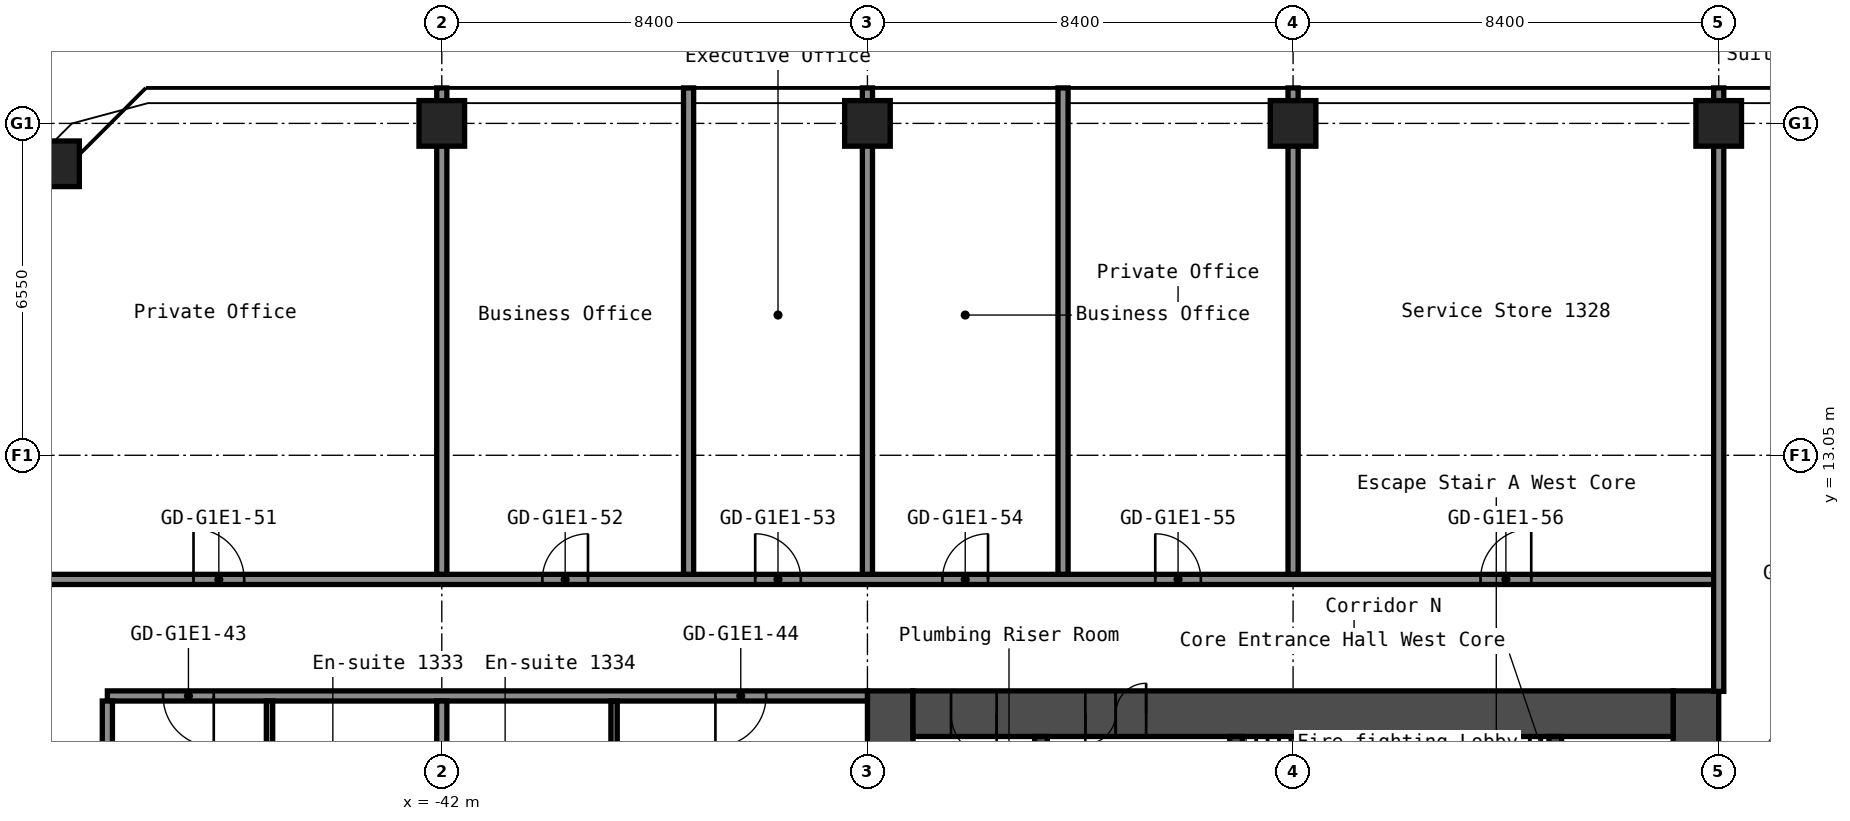
"""IFC4 building model, lengths in metres.
Left out: names, types, materials, properties, quantities, classifications, styles, units other than length and angle.
Written with IfcOpenShell. Run it as: python <this file> out.ifc"""

import sys

from ifc_helpers import new_model, si_unit, direction, frame, frame_2d, origin, origin_2d, place, context, subcontext, project, spatial, rectangle, hollow_rectangle, extrude, element, fill, save


model = new_model("IFC4")
c1 = context("Model", 3, precision=1e-05, world=origin(), true_north=direction((0.0, 1.0)))
c2 = subcontext(c1, "Body", "Model", "MODEL_VIEW")
j1 = project(units=[si_unit("LENGTHUNIT", "METRE"), si_unit("PLANEANGLEUNIT", "RADIAN")], contexts=[c1])
p1 = place(None, origin())
s1 = spatial("IfcSite", under=j1, at=p1, CompositionType="ELEMENT")
p2 = place(p1, origin())
s2 = spatial("IfcBuilding", under=s1, at=p2, CompositionType="ELEMENT")
p3 = place(p2, frame((0.0, 0.0, 48.6)))
s3 = spatial("IfcBuildingStorey", under=s2, at=p3, CompositionType="ELEMENT", Elevation=48.6)
for number, where, z_axis, x_axis in (
    (1, (-49.603, 18.803, 0.0), (0.0, 0.0, 1.0), (1.0, 0.0, 0.0)),
    (2, (-42.0, 19.6, 0.0), (0.0, 0.0, 1.0), (1.0, 0.0, 0.0)),
    (3, (-33.6, 19.6, 0.0), (0.0, 0.0, 1.0), (1.0, 0.0, 0.0)),
    (4, (-25.2, 19.6, 0.0), (0.0, 0.0, 1.0), (1.0, 0.0, 0.0)),
    (5, (-16.8, 19.6, 0.0), (0.0, 0.0, 1.0), (1.0, 0.0, 0.0)),
):
    element("IfcColumn", number, at=place(p3, frame(where, z_axis=z_axis, x_axis=x_axis)), inside=s3, PredefinedType="COLUMN", context=c2, shape_type="SweptSolid", body=[
        extrude(hollow_rectangle(XDim=0.9, YDim=0.9, WallThickness=0.036, at=origin_2d()), origin(), (0.0, 0.0, 1.0), 2.8),
    ])
p4 = place(p3, frame((-17.25, -8.4, 0.0), z_axis=(0.0, 0.0, 1.0), x_axis=(0.0, 1.0, 0.0)))
e6 = element("IfcWall", 6, at=p4, inside=s3, PredefinedType="SHEAR", context=c2, shape_type="SweptSolid", body=[
    extrude(rectangle(XDim=16.8, YDim=0.9, at=frame_2d((8.4, 0.0))), origin(), (0.0, 0.0, 1.0), 2.8),
])
p5 = place(p4, frame((12.75, 0.0, 0.0)))
e7 = element("IfcOpeningElement", 7, at=p5, cuts=e6, PredefinedType="OPENING", context=c2, shape_type="SweptSolid", body=[
    extrude(rectangle(XDim=1.2, YDim=2.1, at=frame_2d((0.6, 1.05))), frame((0.0, 0.46, 0.0), z_axis=(0.0, -1.0, 0.0), x_axis=(1.0, 0.0, 0.0)), (0.0, 0.0, 1.0), 0.92),
])
p6 = place(p4, frame((2.85, 0.0, 0.0)))
e8 = element("IfcOpeningElement", 8, at=p6, cuts=e6, PredefinedType="OPENING", context=c2, shape_type="SweptSolid", body=[
    extrude(rectangle(XDim=1.2, YDim=2.1, at=frame_2d((0.6, 1.05))), frame((0.0, 0.46, 0.0), z_axis=(0.0, -1.0, 0.0), x_axis=(1.0, 0.0, 0.0)), (0.0, 0.0, 1.0), 0.92),
])
p7 = place(p3, frame((-33.15, -8.4, 0.0), z_axis=(0.0, 0.0, 1.0), x_axis=(0.0, 1.0, 0.0)))
e9 = element("IfcWall", 9, at=p7, inside=s3, PredefinedType="SHEAR", context=c2, shape_type="SweptSolid", body=[
    extrude(rectangle(XDim=16.8, YDim=0.9, at=frame_2d((8.4, 0.0))), origin(), (0.0, 0.0, 1.0), 2.8),
])
p8 = place(p3, frame((-32.7, 7.95, 0.0), z_axis=(0.0, 0.0, 1.0), x_axis=(1.0, 0.0, 0.0)))
e10 = element("IfcWall", 10, at=p8, inside=s3, PredefinedType="SHEAR", context=c2, shape_type="SweptSolid", body=[
    extrude(rectangle(XDim=15.0, YDim=0.9, at=frame_2d((7.5, 0.0))), origin(), (0.0, 0.0, 1.0), 2.8),
])
p9 = place(p8, frame((3.4, 0.0, 0.0)))
e11 = element("IfcOpeningElement", 11, at=p9, cuts=e10, PredefinedType="OPENING", context=c2, shape_type="SweptSolid", body=[
    extrude(rectangle(XDim=1.2, YDim=2.1, at=frame_2d((0.6, 1.05))), frame((0.0, 0.46, 0.0), z_axis=(0.0, -1.0, 0.0), x_axis=(1.0, 0.0, 0.0)), (0.0, 0.0, 1.0), 0.92),
])
p10 = place(p8, frame((0.75, 0.0, 0.0)))
e12 = element("IfcOpeningElement", 12, at=p10, cuts=e10, PredefinedType="OPENING", context=c2, shape_type="SweptSolid", body=[
    extrude(rectangle(XDim=0.9, YDim=2.1, at=frame_2d((0.45, 1.05))), frame((0.0, 0.46, 0.0), z_axis=(0.0, -1.0, 0.0), x_axis=(1.0, 0.0, 0.0)), (0.0, 0.0, 1.0), 0.92),
])
p11 = place(p3, frame((-20.025, 1.2, 0.0), z_axis=(0.0, 0.0, 1.0), x_axis=(0.0, 1.0, 0.0)))
e13 = element("IfcWall", 13, at=p11, inside=s3, PredefinedType="SHEAR", context=c2, shape_type="SweptSolid", body=[
    extrude(rectangle(XDim=6.3, YDim=0.25, at=frame_2d((3.15, 0.0))), origin(), (0.0, 0.0, 1.0), 2.8),
])
p12 = place(p3, frame((-26.325, 3.75, 0.0), z_axis=(0.0, 0.0, 1.0), x_axis=(0.0, 1.0, 0.0)))
e14 = element("IfcWall", 14, at=p12, inside=s3, PredefinedType="SHEAR", context=c2, shape_type="SweptSolid", body=[
    extrude(rectangle(XDim=3.75, YDim=0.25, at=frame_2d((1.875, 0.0))), origin(), (0.0, 0.0, 1.0), 2.8),
])
p13 = place(p12, frame((1.25, 0.0, 0.0)))
e15 = element("IfcOpeningElement", 15, at=p13, cuts=e14, PredefinedType="OPENING", context=c2, shape_type="SweptSolid", body=[
    extrude(rectangle(XDim=1.2, YDim=2.1, at=frame_2d((0.6, 1.05))), frame((0.0, 0.135, 0.0), z_axis=(0.0, -1.0, 0.0), x_axis=(1.0, 0.0, 0.0)), (0.0, 0.0, 1.0), 0.27),
])
p14 = place(p3, frame((-30.175, 1.45, 0.0), z_axis=(0.0, 0.0, 1.0), x_axis=(0.0, 1.0, 0.0)))
e16 = element("IfcWall", 16, at=p14, inside=s3, PredefinedType="SHEAR", context=c2, shape_type="SweptSolid", body=[
    extrude(rectangle(XDim=6.05, YDim=0.25, at=frame_2d((3.025, 0.0))), origin(), (0.0, 0.0, 1.0), 2.8),
])
p15 = place(p14, frame((2.625, 0.0, 0.0)))
e17 = element("IfcOpeningElement", 17, at=p15, cuts=e16, PredefinedType="OPENING", context=c2, shape_type="SweptSolid", body=[
    extrude(rectangle(XDim=1.1, YDim=2.1, at=frame_2d((0.55, 1.05))), frame((0.0, 0.135, 0.0), z_axis=(0.0, -1.0, 0.0), x_axis=(1.0, 0.0, 0.0)), (0.0, 0.0, 1.0), 0.27),
])
p16 = place(p3, frame((-48.6, 8.3, 0.0), z_axis=(0.0, 0.0, 1.0), x_axis=(1.0, 0.0, 0.0)))
e18 = element("IfcWall", 18, at=p16, inside=s3, PredefinedType="PARTITIONING", context=c2, shape_type="SweptSolid", body=[
    extrude(rectangle(XDim=15.0, YDim=0.2, at=frame_2d((7.5, 0.0))), origin(), (0.0, 0.0, 1.0), 2.8),
])
p17 = place(p16, frame((1.1, 0.0, 0.0)))
e19 = element("IfcOpeningElement", 19, at=p17, cuts=e18, PredefinedType="OPENING", context=c2, shape_type="SweptSolid", body=[
    extrude(rectangle(XDim=1.0, YDim=2.1, at=frame_2d((0.5, 1.05))), frame((0.0, 0.11, 0.0), z_axis=(0.0, -1.0, 0.0), x_axis=(1.0, 0.0, 0.0)), (0.0, 0.0, 1.0), 0.22),
])
p18 = place(p16, frame((12.0, 0.0, 0.0)))
e20 = element("IfcOpeningElement", 20, at=p18, cuts=e18, PredefinedType="OPENING", context=c2, shape_type="SweptSolid", body=[
    extrude(rectangle(XDim=1.0, YDim=2.1, at=frame_2d((0.5, 1.05))), frame((0.0, 0.11, 0.0), z_axis=(0.0, -1.0, 0.0), x_axis=(1.0, 0.0, 0.0)), (0.0, 0.0, 1.0), 0.22),
])
p19 = place(p3, frame((-51.1, 10.6, 0.0), z_axis=(0.0, 0.0, 1.0), x_axis=(1.0, 0.0, 0.0)))
e21 = element("IfcWall", 21, at=p19, inside=s3, PredefinedType="PARTITIONING", context=c2, shape_type="SweptSolid", body=[
    extrude(rectangle(XDim=34.3, YDim=0.2, at=frame_2d((17.15, 0.0))), origin(), (0.0, 0.0, 1.0), 2.8),
])
p20 = place(p19, frame((4.2, 0.0, 0.0)))
e22 = element("IfcOpeningElement", 22, at=p20, cuts=e21, PredefinedType="OPENING", context=c2, shape_type="SweptSolid", body=[
    extrude(rectangle(XDim=1.0, YDim=2.1, at=frame_2d((0.5, 1.05))), frame((0.0, 0.11, 0.0), z_axis=(0.0, -1.0, 0.0), x_axis=(1.0, 0.0, 0.0)), (0.0, 0.0, 1.0), 0.22),
])
p21 = place(p19, frame((11.085, 0.0, 0.0)))
e23 = element("IfcOpeningElement", 23, at=p21, cuts=e21, PredefinedType="OPENING", context=c2, shape_type="SweptSolid", body=[
    extrude(rectangle(XDim=0.9, YDim=2.1, at=frame_2d((0.45, 1.05))), frame((0.0, 0.11, 0.0), z_axis=(0.0, -1.0, 0.0), x_axis=(1.0, 0.0, 0.0)), (0.0, 0.0, 1.0), 0.22),
])
p22 = place(p19, frame((15.285, 0.0, 0.0)))
e24 = element("IfcOpeningElement", 24, at=p22, cuts=e21, PredefinedType="OPENING", context=c2, shape_type="SweptSolid", body=[
    extrude(rectangle(XDim=0.9, YDim=2.1, at=frame_2d((0.45, 1.05))), frame((0.0, 0.11, 0.0), z_axis=(0.0, -1.0, 0.0), x_axis=(1.0, 0.0, 0.0)), (0.0, 0.0, 1.0), 0.22),
])
p23 = place(p19, frame((18.98, 0.0, 0.0)))
e25 = element("IfcOpeningElement", 25, at=p23, cuts=e21, PredefinedType="OPENING", context=c2, shape_type="SweptSolid", body=[
    extrude(rectangle(XDim=0.9, YDim=2.1, at=frame_2d((0.45, 1.05))), frame((0.0, 0.11, 0.0), z_axis=(0.0, -1.0, 0.0), x_axis=(1.0, 0.0, 0.0)), (0.0, 0.0, 1.0), 0.22),
])
p24 = place(p19, frame((23.18, 0.0, 0.0)))
e26 = element("IfcOpeningElement", 26, at=p24, cuts=e21, PredefinedType="OPENING", context=c2, shape_type="SweptSolid", body=[
    extrude(rectangle(XDim=0.9, YDim=2.1, at=frame_2d((0.45, 1.05))), frame((0.0, 0.11, 0.0), z_axis=(0.0, -1.0, 0.0), x_axis=(1.0, 0.0, 0.0)), (0.0, 0.0, 1.0), 0.22),
])
p25 = place(p19, frame((29.6, 0.0, 0.0)))
e27 = element("IfcOpeningElement", 27, at=p25, cuts=e21, PredefinedType="OPENING", context=c2, shape_type="SweptSolid", body=[
    extrude(rectangle(XDim=1.0, YDim=2.1, at=frame_2d((0.5, 1.05))), frame((0.0, 0.11, 0.0), z_axis=(0.0, -1.0, 0.0), x_axis=(1.0, 0.0, 0.0)), (0.0, 0.0, 1.0), 0.22),
])
p26 = place(p3, frame((-48.6, -8.2, 0.0), z_axis=(0.0, 0.0, 1.0), x_axis=(0.0, 1.0, 0.0)))
e28 = element("IfcWall", 28, at=p26, inside=s3, PredefinedType="PARTITIONING", context=c2, shape_type="SweptSolid", body=[
    extrude(rectangle(XDim=16.4, YDim=0.2, at=frame_2d((8.2, 0.0))), origin(), (0.0, 0.0, 1.0), 2.8),
])
p27 = place(p3, frame((-45.4, 4.9, 0.0), z_axis=(0.0, 0.0, 1.0), x_axis=(0.0, 1.0, 0.0)))
e29 = element("IfcWall", 29, at=p27, inside=s3, PredefinedType="PARTITIONING", context=c2, shape_type="SweptSolid", body=[
    extrude(rectangle(XDim=3.3, YDim=0.125, at=frame_2d((1.65, 0.0))), origin(), (0.0, 0.0, 1.0), 2.8),
])
p28 = place(p3, frame((-42.0, -8.2, 0.0), z_axis=(0.0, 0.0, 1.0), x_axis=(0.0, 1.0, 0.0)))
e30 = element("IfcWall", 30, at=p28, inside=s3, PredefinedType="PARTITIONING", context=c2, shape_type="SweptSolid", body=[
    extrude(rectangle(XDim=16.4, YDim=0.2, at=frame_2d((8.2, 0.0))), origin(), (0.0, 0.0, 1.0), 2.8),
])
p29 = place(p3, frame((-42.0, 10.7, 0.0), z_axis=(0.0, 0.0, 1.0), x_axis=(0.0, 1.0, 0.0)))
e31 = element("IfcWall", 31, at=p29, inside=s3, PredefinedType="PARTITIONING", context=c2, shape_type="SweptSolid", body=[
    extrude(rectangle(XDim=9.6, YDim=0.2, at=frame_2d((4.8, 0.0))), origin(), (0.0, 0.0, 1.0), 2.8),
])
p30 = place(p3, frame((-38.6, 4.9, 0.0), z_axis=(0.0, 0.0, 1.0), x_axis=(0.0, 1.0, 0.0)))
e32 = element("IfcWall", 32, at=p30, inside=s3, PredefinedType="PARTITIONING", context=c2, shape_type="SweptSolid", body=[
    extrude(rectangle(XDim=3.3, YDim=0.125, at=frame_2d((1.65, 0.0))), origin(), (0.0, 0.0, 1.0), 2.8),
])
for number, where, z_axis, x_axis in (
    (33, (-37.13, 10.7, 0.0), (0.0, 0.0, 1.0), (0.0, 1.0, 0.0)),
    (34, (-33.6, 10.7, 0.0), (0.0, 0.0, 1.0), (0.0, 1.0, 0.0)),
    (35, (-29.74, 10.7, 0.0), (0.0, 0.0, 1.0), (0.0, 1.0, 0.0)),
    (36, (-25.2, 10.7, 0.0), (0.0, 0.0, 1.0), (0.0, 1.0, 0.0)),
):
    element("IfcWall", number, at=place(p3, frame(where, z_axis=z_axis, x_axis=x_axis)), inside=s3, PredefinedType="PARTITIONING", context=c2, shape_type="SweptSolid", body=[
        extrude(rectangle(XDim=9.6, YDim=0.2, at=frame_2d((4.8, 0.0))), origin(), (0.0, 0.0, 1.0), 2.8),
    ])
p31 = place(p3, frame((-16.8, 8.39, 0.0), z_axis=(0.0, 0.0, 1.0), x_axis=(0.0, 1.0, 0.0)))
e37 = element("IfcWall", 37, at=p31, inside=s3, PredefinedType="PARTITIONING", context=c2, shape_type="SweptSolid", body=[
    extrude(rectangle(XDim=11.91, YDim=0.2, at=frame_2d((5.955, 0.0))), origin(), (0.0, 0.0, 1.0), 2.8),
])
p32 = place(p9, origin())
e38 = element("IfcDoor", 38, at=p32, inside=s3, OperationType="DOUBLE_DOOR_SINGLE_SWING", PredefinedType="DOOR", context=c2, shape_type="SweptSolid", body=[
    extrude(rectangle(XDim=1.2, YDim=2.1, at=frame_2d((0.6, 1.05))), frame((0.0, 0.025, 0.0), z_axis=(0.0, -1.0, 0.0), x_axis=(1.0, 0.0, 0.0)), (0.0, 0.0, 1.0), 0.05),
])
fill(e11, e38)
p33 = place(p10, origin())
e39 = element("IfcDoor", 39, at=p33, inside=s3, OperationType="SINGLE_SWING_RIGHT", PredefinedType="DOOR", context=c2, shape_type="SweptSolid", body=[
    extrude(rectangle(XDim=0.9, YDim=2.1, at=frame_2d((0.45, 1.05))), frame((0.0, 0.025, 0.0), z_axis=(0.0, -1.0, 0.0), x_axis=(1.0, 0.0, 0.0)), (0.0, 0.0, 1.0), 0.05),
])
fill(e12, e39)
p34 = place(p17, origin())
e40 = element("IfcDoor", 40, at=p34, inside=s3, OperationType="SINGLE_SWING_RIGHT", PredefinedType="DOOR", context=c2, shape_type="SweptSolid", body=[
    extrude(rectangle(XDim=1.0, YDim=2.1, at=frame_2d((0.5, 1.05))), frame((0.0, 0.025, 0.0), z_axis=(0.0, -1.0, 0.0), x_axis=(1.0, 0.0, 0.0)), (0.0, 0.0, 1.0), 0.05),
])
fill(e19, e40)
p35 = place(p18, origin())
e41 = element("IfcDoor", 41, at=p35, inside=s3, OperationType="SINGLE_SWING_LEFT", PredefinedType="DOOR", context=c2, shape_type="SweptSolid", body=[
    extrude(rectangle(XDim=1.0, YDim=2.1, at=frame_2d((0.5, 1.05))), frame((0.0, 0.025, 0.0), z_axis=(0.0, -1.0, 0.0), x_axis=(1.0, 0.0, 0.0)), (0.0, 0.0, 1.0), 0.05),
])
fill(e20, e41)
p36 = place(p20, origin())
e42 = element("IfcDoor", 42, at=p36, inside=s3, OperationType="SINGLE_SWING_RIGHT", PredefinedType="DOOR", context=c2, shape_type="SweptSolid", body=[
    extrude(rectangle(XDim=1.0, YDim=2.1, at=frame_2d((0.5, 1.05))), frame((0.0, 0.025, 0.0), z_axis=(0.0, -1.0, 0.0), x_axis=(1.0, 0.0, 0.0)), (0.0, 0.0, 1.0), 0.05),
])
fill(e22, e42)
p37 = place(p21, origin())
e43 = element("IfcDoor", 43, at=p37, inside=s3, OperationType="SINGLE_SWING_LEFT", PredefinedType="DOOR", context=c2, shape_type="SweptSolid", body=[
    extrude(rectangle(XDim=0.9, YDim=2.1, at=frame_2d((0.45, 1.05))), frame((0.0, 0.025, 0.0), z_axis=(0.0, -1.0, 0.0), x_axis=(1.0, 0.0, 0.0)), (0.0, 0.0, 1.0), 0.05),
])
fill(e23, e43)
p38 = place(p22, origin())
e44 = element("IfcDoor", 44, at=p38, inside=s3, OperationType="SINGLE_SWING_RIGHT", PredefinedType="DOOR", context=c2, shape_type="SweptSolid", body=[
    extrude(rectangle(XDim=0.9, YDim=2.1, at=frame_2d((0.45, 1.05))), frame((0.0, 0.025, 0.0), z_axis=(0.0, -1.0, 0.0), x_axis=(1.0, 0.0, 0.0)), (0.0, 0.0, 1.0), 0.05),
])
fill(e24, e44)
p39 = place(p23, origin())
e45 = element("IfcDoor", 45, at=p39, inside=s3, OperationType="SINGLE_SWING_LEFT", PredefinedType="DOOR", context=c2, shape_type="SweptSolid", body=[
    extrude(rectangle(XDim=0.9, YDim=2.1, at=frame_2d((0.45, 1.05))), frame((0.0, 0.025, 0.0), z_axis=(0.0, -1.0, 0.0), x_axis=(1.0, 0.0, 0.0)), (0.0, 0.0, 1.0), 0.05),
])
fill(e25, e45)
p40 = place(p24, origin())
e46 = element("IfcDoor", 46, at=p40, inside=s3, OperationType="SINGLE_SWING_RIGHT", PredefinedType="DOOR", context=c2, shape_type="SweptSolid", body=[
    extrude(rectangle(XDim=0.9, YDim=2.1, at=frame_2d((0.45, 1.05))), frame((0.0, 0.025, 0.0), z_axis=(0.0, -1.0, 0.0), x_axis=(1.0, 0.0, 0.0)), (0.0, 0.0, 1.0), 0.05),
])
fill(e26, e46)
p41 = place(p25, origin())
e47 = element("IfcDoor", 47, at=p41, inside=s3, OperationType="SINGLE_SWING_LEFT", PredefinedType="DOOR", context=c2, shape_type="SweptSolid", body=[
    extrude(rectangle(XDim=1.0, YDim=2.1, at=frame_2d((0.5, 1.05))), frame((0.0, 0.025, 0.0), z_axis=(0.0, -1.0, 0.0), x_axis=(1.0, 0.0, 0.0)), (0.0, 0.0, 1.0), 0.05),
])
fill(e27, e47)
save(model, sys.argv[1])
